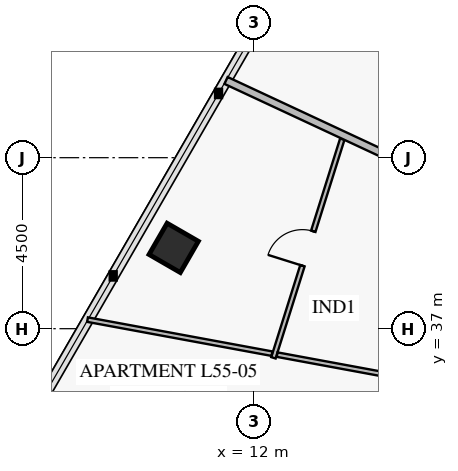
"""IFC4 building model, lengths in metres.
Left out: names, types, materials, properties, quantities, classifications, styles, units other than length and angle.
Written with IfcOpenShell. Run it as: python <this file> out.ifc"""

import sys

from ifc_helpers import new_model, si_unit, direction, frame, frame_2d, origin, origin_2d, place, context, subcontext, project, spatial, rectangle, extrude, element, fill, save


model = new_model("IFC4")
c1 = context("Model", 3, precision=1e-05, world=origin(), true_north=direction((0.0, 1.0)))
c2 = subcontext(c1, "Body", "Model", "MODEL_VIEW")
j1 = project(units=[si_unit("LENGTHUNIT", "METRE"), si_unit("PLANEANGLEUNIT", "RADIAN")], contexts=[c1])
p1 = place(None, origin())
s1 = spatial("IfcSite", under=j1, at=p1, CompositionType="ELEMENT")
p2 = place(p1, origin())
s2 = spatial("IfcBuilding", under=s1, at=p2, CompositionType="ELEMENT")
p3 = place(p2, frame((0.0, 0.0, 218.8)))
s3 = spatial("IfcBuildingStorey", under=s2, at=p3, CompositionType="ELEMENT", Elevation=218.8)
p4 = place(p3, frame((9.892, 39.126, 0.0), z_axis=(0.0, 0.0, 1.0), x_axis=(-0.5, -0.866025403784, 0.0)))
e1 = element("IfcColumn", 1, at=p4, inside=s3, PredefinedType="COLUMN", context=c2, shape_type="SweptSolid", body=[
    extrude(rectangle(XDim=0.95, YDim=0.95, at=origin_2d()), origin(), (0.0, 0.0, 1.0), 3.55),
])
p5 = place(p3, frame((14.328, 41.986, 0.0), z_axis=(0.0, 0.0, 1.0), x_axis=(-0.300371813261, -0.95382219192, 0.0)))
e2 = element("IfcWall", 2, at=p5, inside=s3, PredefinedType="PARTITIONING", context=c2, shape_type="SweptSolid", body=[
    extrude(rectangle(XDim=6.031, YDim=0.12, at=frame_2d((3.016, 0.0))), origin(), (0.0, 0.0, 1.0), 2.9),
])
p6 = place(p5, frame((2.541, 0.0, 0.0)))
e3 = element("IfcOpeningElement", 3, at=p6, cuts=e2, PredefinedType="OPENING", context=c2, shape_type="SweptSolid", body=[
    extrude(rectangle(XDim=0.95, YDim=2.1, at=frame_2d((0.475, 1.05))), frame((0.0, 0.072, 0.0), z_axis=(0.0, -1.0, 0.0), x_axis=(1.0, 0.0, 0.0)), (0.0, 0.0, 1.0), 0.144),
])
p7 = place(p3, frame((22.96, 38.081, 0.0), z_axis=(0.0, 0.0, 1.0), x_axis=(-0.906312686975, 0.422607753629, 0.0)))
e4 = element("IfcWall", 4, at=p7, inside=s3, PredefinedType="PARTITIONING", context=c2, shape_type="SweptSolid", body=[
    extrude(rectangle(XDim=12.899, YDim=0.2, at=frame_2d((6.449, 0.0))), origin(), (0.0, 0.0, 1.0), 2.87),
])
p8 = place(p3, frame((17.564, 35.404, 0.0), z_axis=(0.0, 0.0, 1.0), x_axis=(-0.983379648919, 0.181561191038, 0.0)))
e5 = element("IfcWall", 5, at=p8, inside=s3, PredefinedType="PARTITIONING", context=c2, shape_type="SweptSolid", body=[
    extrude(rectangle(XDim=5.033, YDim=0.12, at=frame_2d((2.517, 0.0))), origin(), (0.0, 0.0, 1.0), 3.55),
])
p9 = place(p3, frame((12.479, 36.342, 0.0), z_axis=(0.0, 0.0, 1.0), x_axis=(-0.983384489308, 0.181534972355, 0.0)))
e6 = element("IfcWall", 6, at=p9, inside=s3, PredefinedType="PARTITIONING", context=c2, shape_type="SweptSolid", body=[
    extrude(rectangle(XDim=4.937, YDim=0.12, at=frame_2d((2.469, 0.0))), origin(), (0.0, 0.0, 1.0), 2.87),
])
p10 = place(p6, frame((0.95, 0.0, 0.0), z_axis=(0.0, 0.0, 1.0), x_axis=(-1.0, 0.0, 0.0)))
e7 = element("IfcDoor", 7, at=p10, inside=s3, OperationType="SINGLE_SWING_LEFT", PredefinedType="DOOR", context=c2, shape_type="SweptSolid", body=[
    extrude(rectangle(XDim=0.95, YDim=2.1, at=frame_2d((0.475, 1.05))), frame((0.0, 0.025, 0.0), z_axis=(0.0, -1.0, 0.0), x_axis=(1.0, 0.0, 0.0)), (0.0, 0.0, 1.0), 0.05),
])
fill(e3, e7)
save(model, sys.argv[1])
